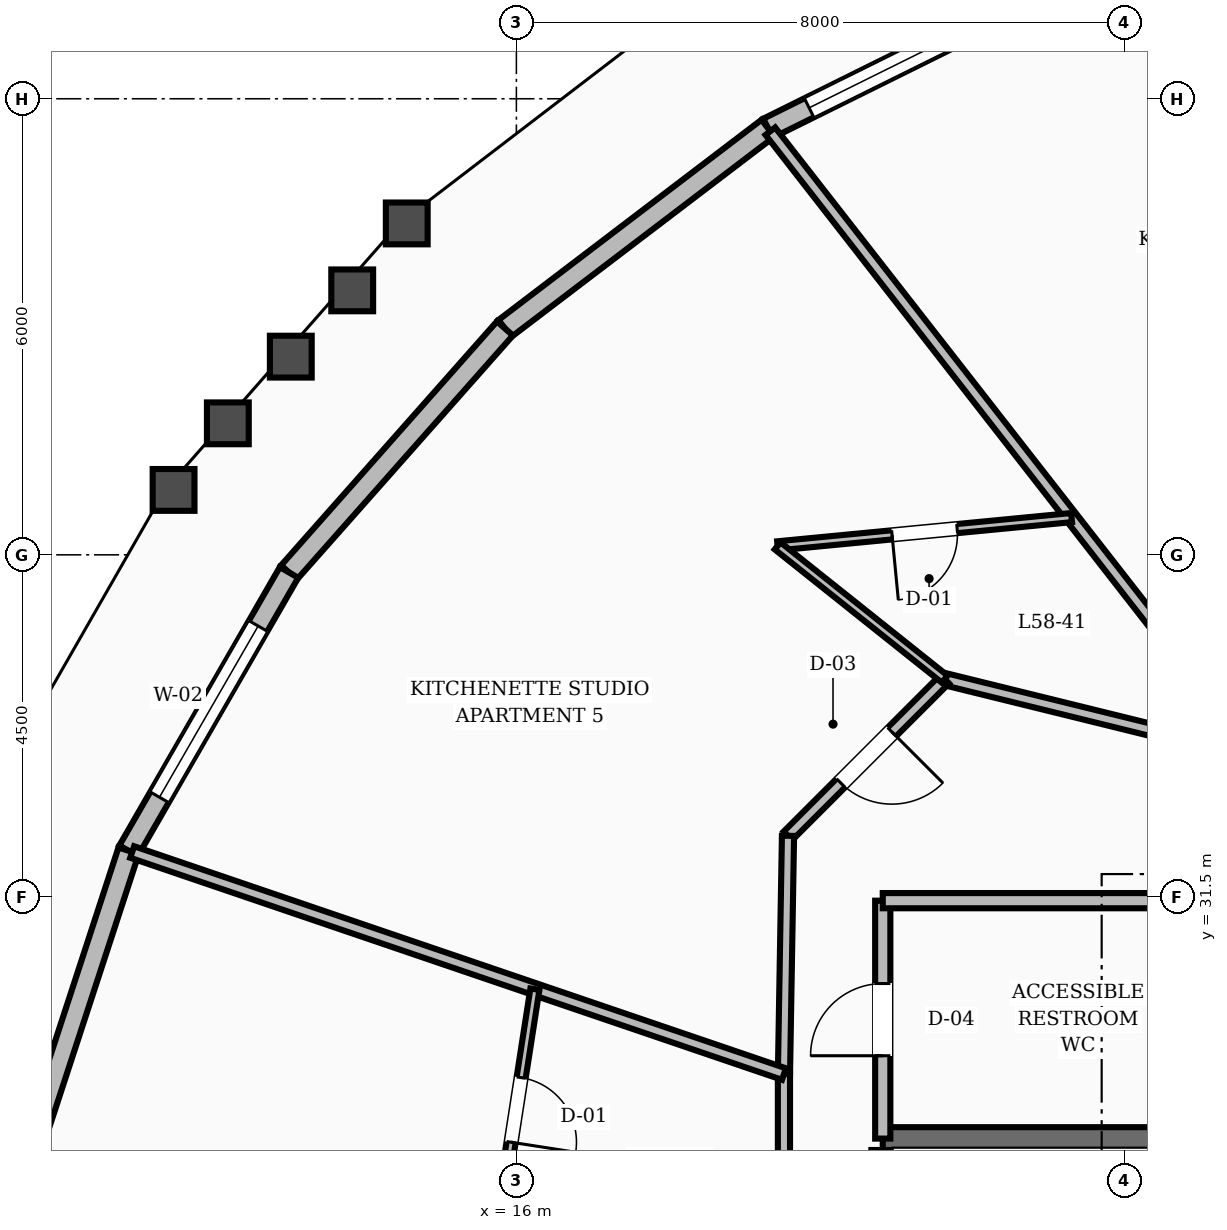
"""IFC4 building model, lengths in metres.
Left out: names, types, materials, properties, quantities, classifications, styles, units other than length and angle.
Written with IfcOpenShell. Run it as: python <this file> out.ifc"""

import sys

from ifc_helpers import new_model, si_unit, direction, frame, frame_2d, origin, place, context, subcontext, project, spatial, rectangle, extrude, element, fill, save


model = new_model("IFC4")
c1 = context("Model", 3, precision=1e-05, world=origin(), true_north=direction((0.0, 1.0)))
c2 = subcontext(c1, "Body", "Model", "MODEL_VIEW")
j1 = project(units=[si_unit("LENGTHUNIT", "METRE"), si_unit("PLANEANGLEUNIT", "RADIAN")], contexts=[c1])
p1 = place(None, origin())
s1 = spatial("IfcSite", under=j1, at=p1, CompositionType="ELEMENT")
p2 = place(p1, origin())
s2 = spatial("IfcBuilding", under=s1, at=p2, CompositionType="ELEMENT")
p3 = place(p2, frame((0.0, 0.0, 225.6)))
s3 = spatial("IfcBuildingStorey", under=s2, at=p3, CompositionType="ELEMENT", Elevation=225.6)
for number, where, z_axis, x_axis in (
    (1, (20.82, 19.43, 0.0), (0.0, 0.0, 1.0), (0.0, 1.0, 0.0)),
    (2, (24.42, 19.43, 0.0), (0.0, 0.0, 1.0), (0.0, 1.0, 0.0)),
):
    element("IfcWall", number, at=place(p3, frame(where, z_axis=z_axis, x_axis=x_axis)), inside=s3, PredefinedType="SHEAR", context=c2, shape_type="SweptSolid", body=[
        extrude(rectangle(XDim=8.74, YDim=0.3, at=frame_2d((4.37, 0.0))), origin(), (0.0, 0.0, 1.0), 3.6),
    ])
p4 = place(p3, frame((20.82, 28.32, 0.0), z_axis=(0.0, 0.0, 1.0), x_axis=(1.0, 0.0, 0.0)))
e3 = element("IfcWall", 3, at=p4, inside=s3, PredefinedType="SHEAR", context=c2, shape_type="SweptSolid", body=[
    extrude(rectangle(XDim=3.6, YDim=0.3, at=frame_2d((1.8, 0.0))), origin(), (0.0, 0.0, 1.0), 3.6),
])
p5 = place(p3, frame((23.259, 43.57, 0.0), z_axis=(0.0, 0.0, 1.0), x_axis=(-0.89596177971, -0.44413116227, 0.0)))
e4 = element("IfcWall", 4, at=p5, inside=s3, PredefinedType="STANDARD", context=c2, shape_type="SweptSolid", body=[
    extrude(rectangle(XDim=4.407, YDim=0.28, at=frame_2d((2.204, 0.0))), origin(), (0.0, 0.0, 1.0), 2.88),
])
p6 = place(p5, frame((0.604, 0.0, 0.8)))
e5 = element("IfcOpeningElement", 5, at=p6, cuts=e4, PredefinedType="OPENING", context=c2, shape_type="SweptSolid", body=[
    extrude(rectangle(XDim=3.2, YDim=1.65, at=frame_2d((1.6, 0.825))), frame((0.0, 0.15, 0.0), z_axis=(0.0, -1.0, 0.0), x_axis=(1.0, 0.0, 0.0)), (0.0, 0.0, 1.0), 0.3),
])
p7 = place(p3, frame((19.31, 41.613, 0.0), z_axis=(0.0, 0.0, 1.0), x_axis=(-0.795722836513, -0.605660934394, 0.0)))
e6 = element("IfcWall", 6, at=p7, inside=s3, PredefinedType="STANDARD", context=c2, shape_type="SweptSolid", body=[
    extrude(rectangle(XDim=4.349, YDim=0.28, at=frame_2d((2.175, 0.0))), origin(), (0.0, 0.0, 1.0), 2.88),
])
p8 = place(p3, frame((15.849, 38.978, 0.0), z_axis=(0.0, 0.0, 1.0), x_axis=(-0.662704142497, -0.748881312037, 0.0)))
e7 = element("IfcWall", 7, at=p8, inside=s3, PredefinedType="STANDARD", context=c2, shape_type="SweptSolid", body=[
    extrude(rectangle(XDim=4.286, YDim=0.28, at=frame_2d((2.143, 0.0))), origin(), (0.0, 0.0, 1.0), 2.88),
])
p9 = place(p3, frame((13.009, 35.768, 0.0), z_axis=(0.0, 0.0, 1.0), x_axis=(-0.499382401046, -0.866381681204, 0.0)))
e8 = element("IfcWall", 8, at=p9, inside=s3, PredefinedType="STANDARD", context=c2, shape_type="SweptSolid", body=[
    extrude(rectangle(XDim=4.227, YDim=0.28, at=frame_2d((2.113, 0.0))), origin(), (0.0, 0.0, 1.0), 2.88),
])
p10 = place(p9, frame((0.813, 0.0, 0.8)))
e9 = element("IfcOpeningElement", 9, at=p10, cuts=e8, PredefinedType="OPENING", context=c2, shape_type="SweptSolid", body=[
    extrude(rectangle(XDim=2.6, YDim=1.65, at=frame_2d((1.3, 0.825))), frame((0.0, 0.15, 0.0), z_axis=(0.0, -1.0, 0.0), x_axis=(1.0, 0.0, 0.0)), (0.0, 0.0, 1.0), 0.3),
])
p11 = place(p3, frame((10.898, 32.106, 0.0), z_axis=(0.0, 0.0, 1.0), x_axis=(-0.310844369952, -0.950460823848, 0.0)))
e10 = element("IfcWall", 10, at=p11, inside=s3, PredefinedType="STANDARD", context=c2, shape_type="SweptSolid", body=[
    extrude(rectangle(XDim=4.181, YDim=0.28, at=frame_2d((2.09, 0.0))), origin(), (0.0, 0.0, 1.0), 2.88),
])
p12 = place(p3, frame((20.82, 28.32, 0.0), z_axis=(0.0, 0.0, 1.0), x_axis=(0.0, 1.0, 0.0)))
e11 = element("IfcWall", 11, at=p12, inside=s3, PredefinedType="SOLIDWALL", context=c2, shape_type="SweptSolid", body=[
    extrude(rectangle(XDim=3.13, YDim=0.2, at=frame_2d((1.565, 0.0))), origin(), (0.0, 0.0, 1.0), 2.87),
])
p13 = place(p12, frame((1.09, 0.0, 0.0)))
e12 = element("IfcOpeningElement", 12, at=p13, cuts=e11, PredefinedType="OPENING", context=c2, shape_type="SweptSolid", body=[
    extrude(rectangle(XDim=0.95, YDim=2.1, at=frame_2d((0.475, 1.05))), frame((0.0, 0.11, 0.0), z_axis=(0.0, -1.0, 0.0), x_axis=(1.0, 0.0, 0.0)), (0.0, 0.0, 1.0), 0.22),
])
p14 = place(p3, frame((20.82, 31.45, 0.0), z_axis=(0.0, 0.0, 1.0), x_axis=(1.0, 0.0, 0.0)))
e13 = element("IfcWall", 13, at=p14, inside=s3, PredefinedType="SOLIDWALL", context=c2, shape_type="SweptSolid", body=[
    extrude(rectangle(XDim=3.98, YDim=0.2, at=frame_2d((1.99, 0.0))), origin(), (0.0, 0.0, 1.0), 2.87),
])
p15 = place(p3, frame((25.752, 33.35, 0.0), z_axis=(0.0, 0.0, 1.0), x_axis=(-0.970939799552, 0.239323850978, 0.0)))
e14 = element("IfcWall", 14, at=p15, inside=s3, PredefinedType="SOLIDWALL", context=c2, shape_type="SweptSolid", body=[
    extrude(rectangle(XDim=4.241, YDim=0.16, at=frame_2d((2.12, 0.0))), origin(), (0.0, 0.0, 1.0), 2.87),
])
p16 = place(p3, frame((21.635, 34.365, 0.0), z_axis=(0.0, 0.0, 1.0), x_axis=(-0.707106781187, -0.707106781187, 0.0)))
e15 = element("IfcWall", 15, at=p16, inside=s3, PredefinedType="SOLIDWALL", context=c2, shape_type="SweptSolid", body=[
    extrude(rectangle(XDim=2.916, YDim=0.16, at=frame_2d((1.458, 0.0))), origin(), (0.0, 0.0, 1.0), 2.87),
])
p17 = place(p16, frame((0.983, 0.0, 0.0)))
e16 = element("IfcOpeningElement", 16, at=p17, cuts=e15, PredefinedType="OPENING", context=c2, shape_type="SweptSolid", body=[
    extrude(rectangle(XDim=0.95, YDim=2.1, at=frame_2d((0.475, 1.05))), frame((0.0, 0.09, 0.0), z_axis=(0.0, -1.0, 0.0), x_axis=(1.0, 0.0, 0.0)), (0.0, 0.0, 1.0), 0.18),
])
p18 = place(p3, frame((19.573, 32.303, 0.0), z_axis=(0.0, 0.0, 1.0), x_axis=(-0.016981035134, -0.999855811828, 0.0)))
e17 = element("IfcWall", 17, at=p18, inside=s3, PredefinedType="SOLIDWALL", context=c2, shape_type="SweptSolid", body=[
    extrude(rectangle(XDim=3.134, YDim=0.16, at=frame_2d((1.567, 0.0))), origin(), (0.0, 0.0, 1.0), 2.87),
])
p19 = place(p3, frame((19.52, 29.169, 0.0), z_axis=(0.0, 0.0, 1.0), x_axis=(0.0, -1.0, 0.0)))
e18 = element("IfcWall", 18, at=p19, inside=s3, PredefinedType="SOLIDWALL", context=c2, shape_type="SweptSolid", body=[
    extrude(rectangle(XDim=2.687, YDim=0.16, at=frame_2d((1.344, 0.0))), origin(), (0.0, 0.0, 1.0), 2.87),
])
p20 = place(p3, frame((25.752, 33.35, 0.0), z_axis=(0.0, 0.0, 1.0), x_axis=(-0.614883592215, 0.788617884672, 0.0)))
e19 = element("IfcWall", 19, at=p20, inside=s3, PredefinedType="SOLIDWALL", context=c2, shape_type="SweptSolid", body=[
    extrude(rectangle(XDim=10.427, YDim=0.16, at=frame_2d((5.213, 0.0))), origin(), (0.0, 0.0, 1.0), 2.87),
])
p21 = place(p3, frame((23.304, 36.49, 0.0), z_axis=(0.0, 0.0, 1.0), x_axis=(-0.995411791271, -0.09568367572, 0.0)))
e20 = element("IfcWall", 20, at=p21, inside=s3, PredefinedType="PARTITIONING", context=c2, shape_type="SweptSolid", body=[
    extrude(rectangle(XDim=3.886, YDim=0.12, at=frame_2d((1.943, 0.0))), origin(), (0.0, 0.0, 1.0), 2.87),
])
p22 = place(p21, frame((1.513, 0.0, 0.0)))
e21 = element("IfcOpeningElement", 21, at=p22, cuts=e20, PredefinedType="OPENING", context=c2, shape_type="SweptSolid", body=[
    extrude(rectangle(XDim=0.86, YDim=2.1, at=frame_2d((0.43, 1.05))), frame((0.0, 0.07, 0.0), z_axis=(0.0, -1.0, 0.0), x_axis=(1.0, 0.0, 0.0)), (0.0, 0.0, 1.0), 0.14),
])
p23 = place(p3, frame((21.635, 34.365, 0.0), z_axis=(0.0, 0.0, 1.0), x_axis=(-0.781918038943, 0.623381248014, 0.0)))
e22 = element("IfcWall", 22, at=p23, inside=s3, PredefinedType="PARTITIONING", context=c2, shape_type="SweptSolid", body=[
    extrude(rectangle(XDim=2.812, YDim=0.12, at=frame_2d((1.406, 0.0))), origin(), (0.0, 0.0, 1.0), 2.87),
])
p24 = place(p3, frame((19.52, 29.169, 0.0), z_axis=(0.0, 0.0, 1.0), x_axis=(-0.946595836361, 0.322422583862, 0.0)))
e23 = element("IfcWall", 23, at=p24, inside=s3, PredefinedType="SOLIDWALL", context=c2, shape_type="SweptSolid", body=[
    extrude(rectangle(XDim=9.058, YDim=0.16, at=frame_2d((4.529, 0.0))), origin(), (0.0, 0.0, 1.0), 2.87),
])
p25 = place(p3, frame((16.244, 30.285, 0.0), z_axis=(0.0, 0.0, 1.0), x_axis=(-0.153660860634, -0.988123646063, 0.0)))
e24 = element("IfcWall", 24, at=p25, inside=s3, PredefinedType="PARTITIONING", context=c2, shape_type="SweptSolid", body=[
    extrude(rectangle(XDim=3.214, YDim=0.12, at=frame_2d((1.607, 0.0))), origin(), (0.0, 0.0, 1.0), 2.87),
])
p26 = place(p25, frame((1.177, 0.0, 0.0)))
e25 = element("IfcOpeningElement", 25, at=p26, cuts=e24, PredefinedType="OPENING", context=c2, shape_type="SweptSolid", body=[
    extrude(rectangle(XDim=0.86, YDim=2.1, at=frame_2d((0.43, 1.05))), frame((0.0, 0.07, 0.0), z_axis=(0.0, -1.0, 0.0), x_axis=(1.0, 0.0, 0.0)), (0.0, 0.0, 1.0), 0.14),
])
p27 = place(p6, origin())
e26 = element("IfcWindow", 26, at=p27, inside=s3, PartitioningType="SINGLE_PANEL", PredefinedType="WINDOW", context=c2, shape_type="SweptSolid", body=[
    extrude(rectangle(XDim=3.2, YDim=1.65, at=frame_2d((1.6, 0.825))), frame((0.0, 0.03, 0.0), z_axis=(0.0, -1.0, 0.0), x_axis=(1.0, 0.0, 0.0)), (0.0, 0.0, 1.0), 0.06),
])
fill(e5, e26)
p28 = place(p10, origin())
e27 = element("IfcWindow", 27, at=p28, inside=s3, PartitioningType="SINGLE_PANEL", PredefinedType="WINDOW", context=c2, shape_type="SweptSolid", body=[
    extrude(rectangle(XDim=2.6, YDim=1.65, at=frame_2d((1.3, 0.825))), frame((0.0, 0.03, 0.0), z_axis=(0.0, -1.0, 0.0), x_axis=(1.0, 0.0, 0.0)), (0.0, 0.0, 1.0), 0.06),
])
fill(e9, e27)
p29 = place(p13, origin())
e28 = element("IfcDoor", 28, at=p29, inside=s3, OperationType="SINGLE_SWING_LEFT", PredefinedType="DOOR", context=c2, shape_type="SweptSolid", body=[
    extrude(rectangle(XDim=0.95, YDim=2.1, at=frame_2d((0.475, 1.05))), frame((0.0, 0.025, 0.0), z_axis=(0.0, -1.0, 0.0), x_axis=(1.0, 0.0, 0.0)), (0.0, 0.0, 1.0), 0.05),
])
fill(e12, e28)
p30 = place(p22, origin())
e29 = element("IfcDoor", 29, at=p30, inside=s3, OperationType="SINGLE_SWING_RIGHT", PredefinedType="DOOR", context=c2, shape_type="SweptSolid", body=[
    extrude(rectangle(XDim=0.86, YDim=2.1, at=frame_2d((0.43, 1.05))), frame((0.0, 0.025, 0.0), z_axis=(0.0, -1.0, 0.0), x_axis=(1.0, 0.0, 0.0)), (0.0, 0.0, 1.0), 0.05),
])
fill(e21, e29)
p31 = place(p17, origin())
e30 = element("IfcDoor", 30, at=p31, inside=s3, OperationType="SINGLE_SWING_LEFT", PredefinedType="DOOR", context=c2, shape_type="SweptSolid", body=[
    extrude(rectangle(XDim=0.95, YDim=2.1, at=frame_2d((0.475, 1.05))), frame((0.0, 0.025, 0.0), z_axis=(0.0, -1.0, 0.0), x_axis=(1.0, 0.0, 0.0)), (0.0, 0.0, 1.0), 0.05),
])
fill(e16, e30)
p32 = place(p26, origin())
e31 = element("IfcDoor", 31, at=p32, inside=s3, OperationType="SINGLE_SWING_RIGHT", PredefinedType="DOOR", context=c2, shape_type="SweptSolid", body=[
    extrude(rectangle(XDim=0.86, YDim=2.1, at=frame_2d((0.43, 1.05))), frame((0.0, 0.025, 0.0), z_axis=(0.0, -1.0, 0.0), x_axis=(1.0, 0.0, 0.0)), (0.0, 0.0, 1.0), 0.05),
])
fill(e25, e31)
save(model, sys.argv[1])
